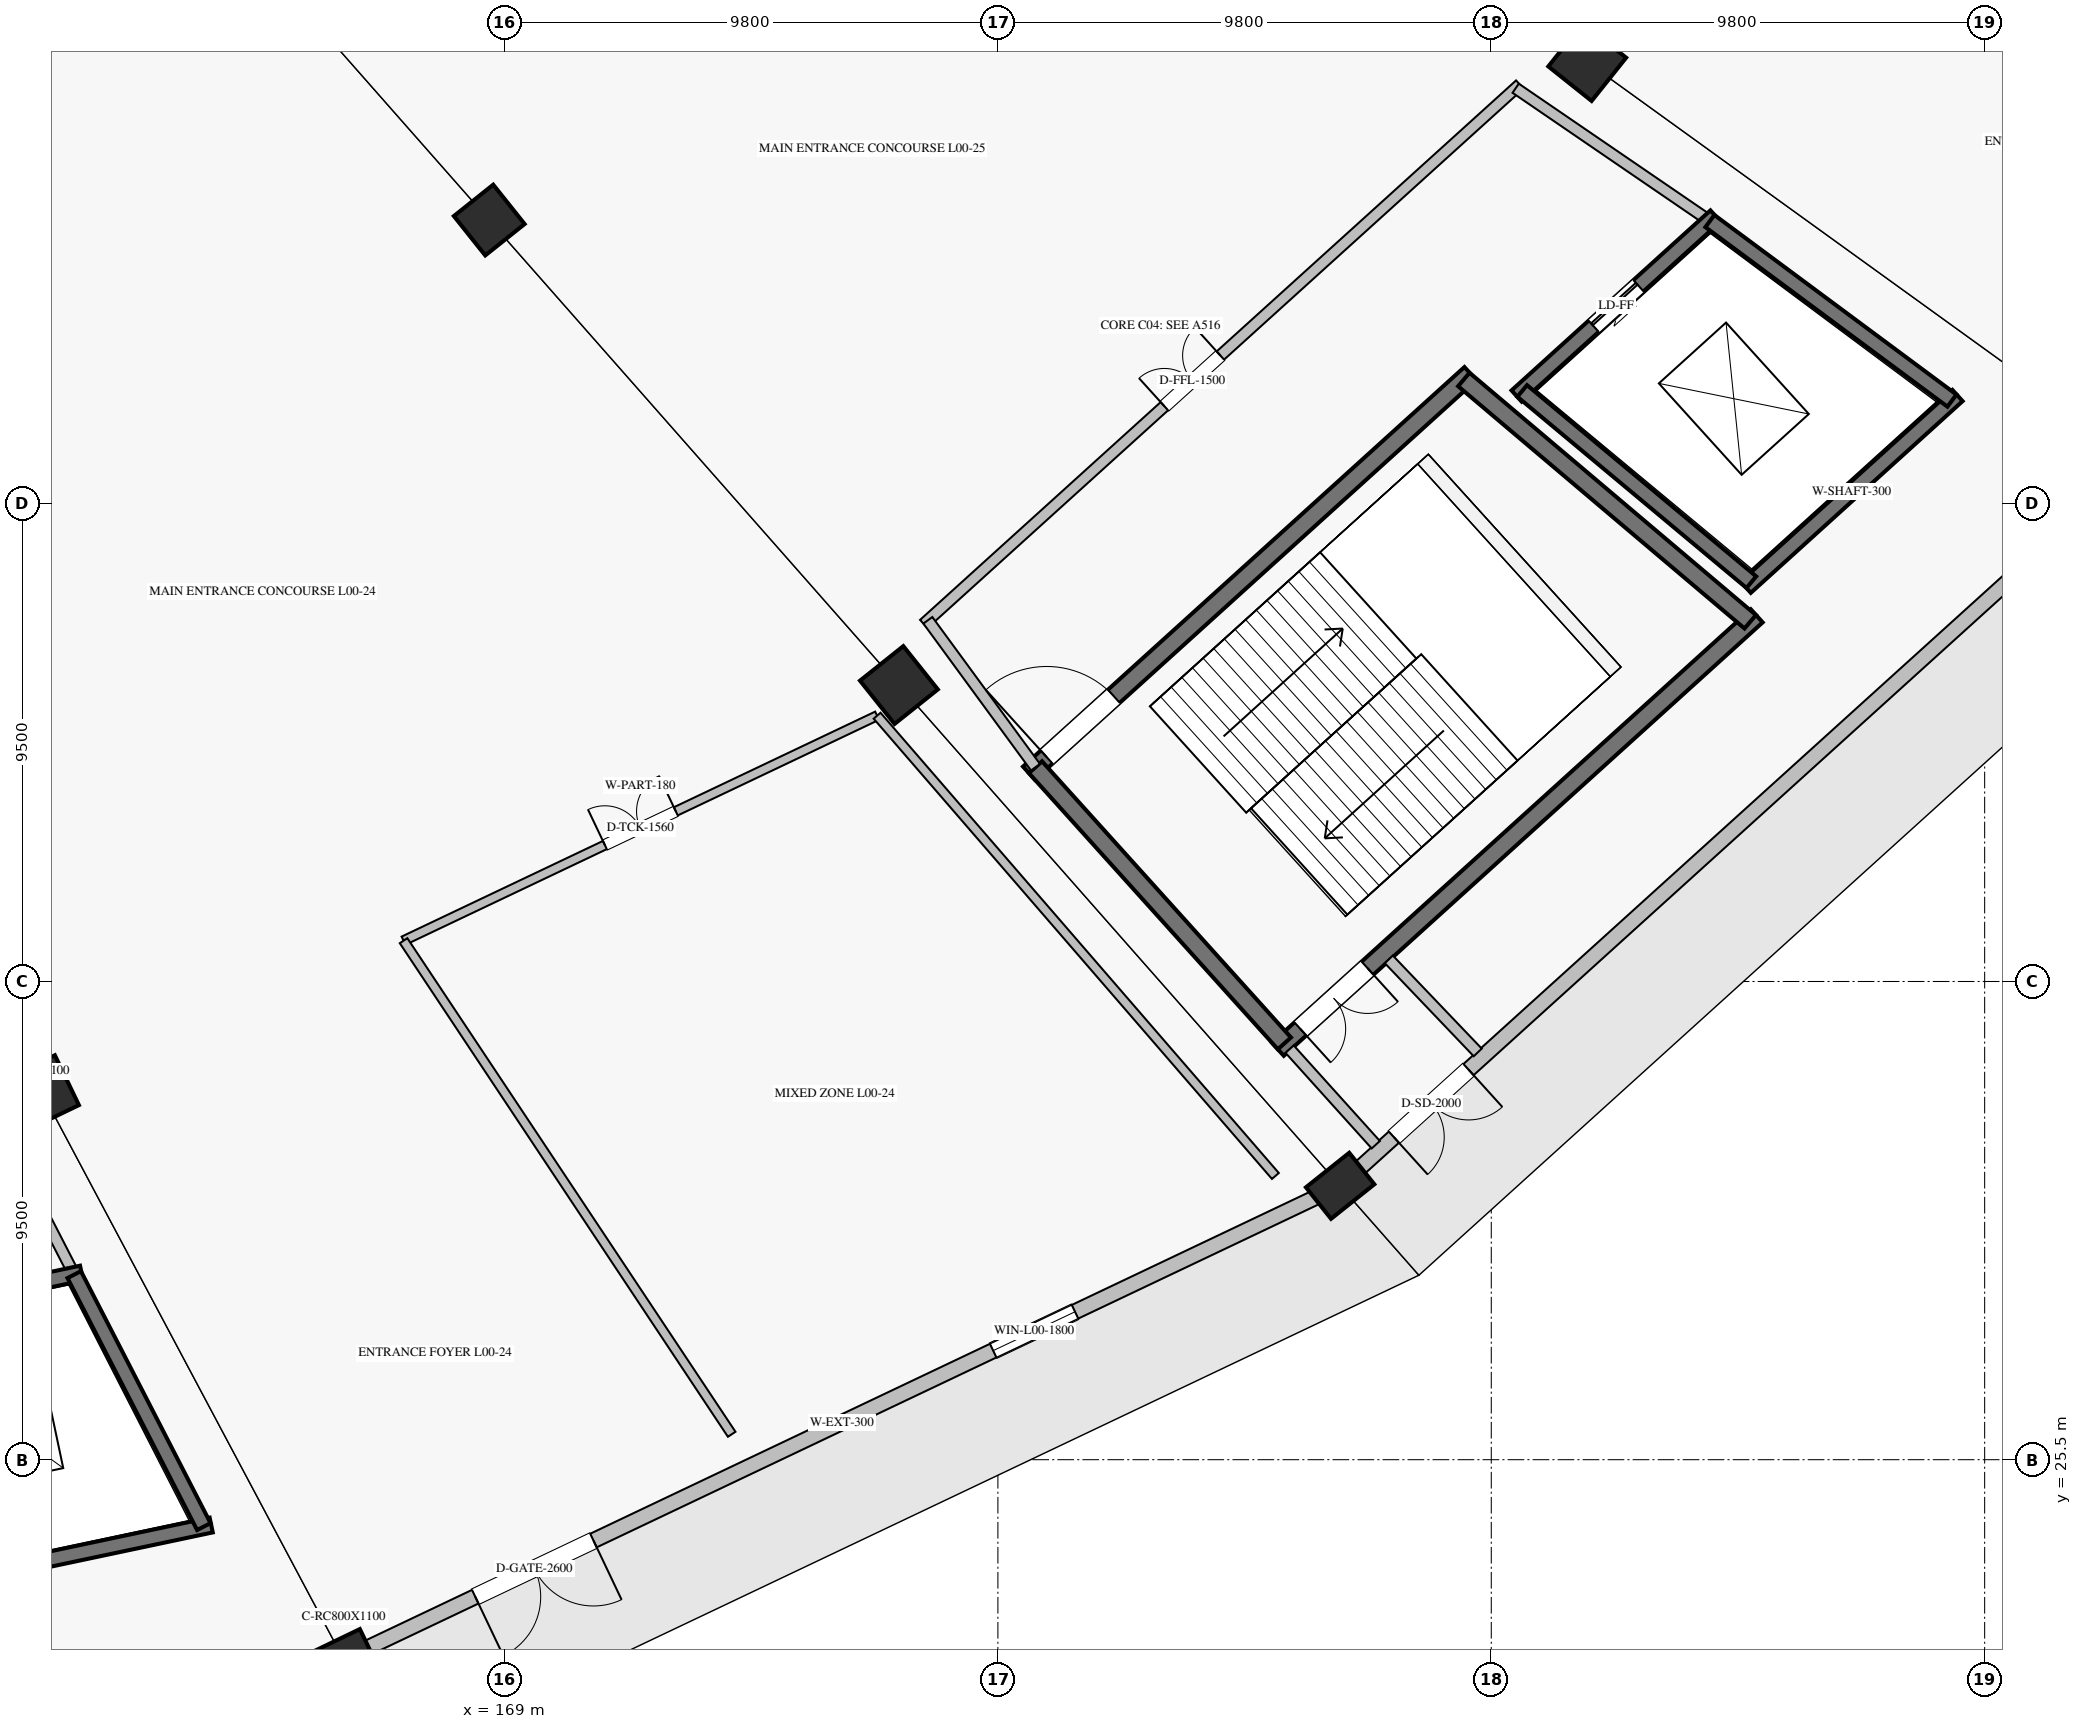
"""IFC4 building model, lengths in metres.
Left out: names, types, materials, properties, quantities, classifications, styles, units other than length and angle.
Written with IfcOpenShell. Run it as: python <this file> out.ifc"""

import sys

from ifc_helpers import new_model, si_unit, direction, frame, frame_2d, origin, origin_2d, place, context, subcontext, project, spatial, rectangle, extrude, element, fill, save


model = new_model("IFC4")
c1 = context("Model", 3, precision=1e-05, world=origin(), true_north=direction((0.0, 1.0)))
c2 = subcontext(c1, "Body", "Model", "MODEL_VIEW")
j1 = project(units=[si_unit("LENGTHUNIT", "METRE"), si_unit("PLANEANGLEUNIT", "RADIAN")], contexts=[c1])
p1 = place(None, origin())
s1 = spatial("IfcSite", under=j1, at=p1, CompositionType="ELEMENT")
p2 = place(p1, origin())
s2 = spatial("IfcBuilding", under=s1, at=p2, CompositionType="ELEMENT")
p3 = place(p2, origin())
s3 = spatial("IfcBuildingStorey", under=s2, at=p3, CompositionType="ELEMENT", Elevation=0.0)
p4 = place(p3, frame((168.697, 50.127, 0.0), z_axis=(0.0, 0.0, 1.0), x_axis=(0.623489801853, -0.781831482473, 0.0)))
e1 = element("IfcColumn", 1, at=p4, inside=s3, PredefinedType="COLUMN", context=c2, shape_type="SweptSolid", body=[
    extrude(rectangle(XDim=1.0, YDim=1.0, at=origin_2d()), origin(), (0.0, 0.0, 1.0), 5.78),
])
for number, where, z_axis, x_axis in (
    (2, (159.812, 32.801, 0.0), (0.0, 0.0, 1.0), (0.434, -0.901, 0.0)),
    (3, (176.834, 40.889, 0.0), (0.0, 0.0, 1.0), (0.623, -0.782, 0.0)),
    (4, (190.506, 53.266, 0.0), (0.0, 0.0, 1.0), (0.782, -0.623, 0.0)),
):
    element("IfcColumn", number, at=place(p3, frame(where, z_axis=z_axis, x_axis=x_axis)), inside=s3, PredefinedType="COLUMN", context=c2, shape_type="SweptSolid", body=[
        extrude(rectangle(XDim=1.1, YDim=1.1, at=origin_2d()), origin(), (0.0, 0.0, 1.0), 5.78),
    ])
for number, where, z_axis, x_axis in (
    (5, (165.805, 21.536, 0.0), (0.0, 0.0, 1.0), (0.434, -0.901, 0.0)),
    (6, (185.598, 30.941, 0.0), (0.0, 0.0, 1.0), (0.623, -0.782, 0.0)),
):
    element("IfcColumn", number, at=place(p3, frame(where, z_axis=z_axis, x_axis=x_axis)), inside=s3, PredefinedType="COLUMN", context=c2, shape_type="SweptSolid", body=[
        extrude(rectangle(XDim=0.8, YDim=1.1, at=origin_2d()), origin(), (0.0, 0.0, 1.0), 5.78),
    ])
p5 = place(p3, frame((166.157, 21.703, 0.0), z_axis=(0.0, 0.0, 1.0), x_axis=(0.903214032263, 0.429190414528, 0.0)))
e7 = element("IfcWall", 7, at=p5, inside=s3, PredefinedType="SOLIDWALL", context=c2, shape_type="SweptSolid", body=[
    extrude(rectangle(XDim=21.134, YDim=0.3, at=frame_2d((10.567, 0.0))), origin(), (0.0, 0.0, 1.0), 4.8),
])
p6 = place(p5, frame((2.504, 0.0, 0.0)))
e8 = element("IfcOpeningElement", 8, at=p6, cuts=e7, PredefinedType="OPENING", context=c2, shape_type="SweptSolid", body=[
    extrude(rectangle(XDim=2.6, YDim=2.4, at=frame_2d((1.3, 1.2))), frame((0.0, 0.16, 0.0), z_axis=(0.0, -1.0, 0.0), x_axis=(1.0, 0.0, 0.0)), (0.0, 0.0, 1.0), 0.32),
])
p7 = place(p5, frame((13.894, 0.0, 1.1)))
e9 = element("IfcOpeningElement", 9, at=p7, cuts=e7, PredefinedType="OPENING", context=c2, shape_type="SweptSolid", body=[
    extrude(rectangle(XDim=1.8, YDim=1.5, at=frame_2d((0.9, 0.75))), frame((0.0, 0.16, 0.0), z_axis=(0.0, -1.0, 0.0), x_axis=(1.0, 0.0, 0.0)), (0.0, 0.0, 1.0), 0.32),
])
p8 = place(p3, frame((185.887, 31.203, 0.0), z_axis=(0.0, 0.0, 1.0), x_axis=(0.741354093053, 0.671114080253, 0.0)))
e10 = element("IfcWall", 10, at=p8, inside=s3, PredefinedType="SOLIDWALL", context=c2, shape_type="SweptSolid", body=[
    extrude(rectangle(XDim=20.664, YDim=0.3, at=frame_2d((10.332, 0.0))), origin(), (0.0, 0.0, 1.0), 4.8),
])
p9 = place(p8, frame((1.05, 0.0, 0.0)))
e11 = element("IfcOpeningElement", 11, at=p9, cuts=e10, PredefinedType="OPENING", context=c2, shape_type="SweptSolid", body=[
    extrude(rectangle(XDim=2.0, YDim=2.3, at=frame_2d((1.0, 1.15))), frame((0.0, 0.16, 0.0), z_axis=(0.0, -1.0, 0.0), x_axis=(1.0, 0.0, 0.0)), (0.0, 0.0, 1.0), 0.32),
])
p10 = place(p3, frame((154.999, 28.023, 0.0), z_axis=(0.0, 0.0, 1.0), x_axis=(0.978345218992, 0.206979787601, 0.0)))
e12 = element("IfcWall", 12, at=p10, inside=s3, PredefinedType="SHEAR", context=c2, shape_type="SweptSolid", body=[
    extrude(rectangle(XDim=5.724, YDim=0.3, at=frame_2d((2.862, 0.0))), origin(), (0.0, 0.0, 1.0), 5.5),
])
p11 = place(p10, frame((2.462, 0.0, 0.0)))
e13 = element("IfcOpeningElement", 13, at=p11, cuts=e12, PredefinedType="OPENING", context=c2, shape_type="SweptSolid", body=[
    extrude(rectangle(XDim=1.1, YDim=2.2, at=frame_2d((0.55, 1.1))), frame((0.0, 0.16, 0.0), z_axis=(0.0, -1.0, 0.0), x_axis=(1.0, 0.0, 0.0)), (0.0, 0.0, 1.0), 0.32),
])
p12 = place(p3, frame((157.523, 23.006, 0.0), z_axis=(0.0, 0.0, 1.0), x_axis=(0.978347069901, 0.206971038591, 0.0)))
e14 = element("IfcWall", 14, at=p12, inside=s3, PredefinedType="SHEAR", context=c2, shape_type="SweptSolid", body=[
    extrude(rectangle(XDim=5.776, YDim=0.3, at=frame_2d((2.888, 0.0))), origin(), (0.0, 0.0, 1.0), 5.5),
])
p13 = place(p3, frame((160.453, 29.177, 0.0), z_axis=(0.0, 0.0, 1.0), x_axis=(0.457368592987, -0.889277217829, 0.0)))
e15 = element("IfcWall", 15, at=p13, inside=s3, PredefinedType="SHEAR", context=c2, shape_type="SweptSolid", body=[
    extrude(rectangle(XDim=5.629, YDim=0.3, at=frame_2d((2.814, 0.0))), origin(), (0.0, 0.0, 1.0), 5.5),
])
p14 = place(p3, frame((158.792, 32.406, 0.0), z_axis=(0.0, 0.0, 1.0), x_axis=(0.457349531643, -0.889287021105, 0.0)))
e16 = element("IfcWall", 16, at=p14, inside=s3, PredefinedType="SOLIDWALL", context=c2, shape_type="SweptSolid", body=[
    extrude(rectangle(XDim=3.632, YDim=0.22, at=frame_2d((1.816, 0.0))), origin(), (0.0, 0.0, 1.0), 5.5),
])
p15 = place(p3, frame((179.417, 39.14, 0.0), z_axis=(0.0, 0.0, 1.0), x_axis=(0.741348929385, 0.671119784315, 0.0)))
e17 = element("IfcWall", 17, at=p15, inside=s3, PredefinedType="SHEAR", context=c2, shape_type="SweptSolid", body=[
    extrude(rectangle(XDim=11.826, YDim=0.35, at=frame_2d((5.913, 0.0))), origin(), (0.0, 0.0, 1.0), 5.5),
])
p16 = place(p15, frame((0.475, 0.0, 0.0)))
e18 = element("IfcOpeningElement", 18, at=p16, cuts=e17, PredefinedType="OPENING", context=c2, shape_type="SweptSolid", body=[
    extrude(rectangle(XDim=1.8, YDim=2.2, at=frame_2d((0.9, 1.1))), frame((0.0, 0.185, 0.0), z_axis=(0.0, -1.0, 0.0), x_axis=(1.0, 0.0, 0.0)), (0.0, 0.0, 1.0), 0.37),
])
p17 = place(p3, frame((184.361, 33.653, 0.0), z_axis=(0.0, 0.0, 1.0), x_axis=(0.741351373721, 0.671117084183, 0.0)))
e19 = element("IfcWall", 19, at=p17, inside=s3, PredefinedType="SHEAR", context=c2, shape_type="SweptSolid", body=[
    extrude(rectangle(XDim=12.83, YDim=0.35, at=frame_2d((6.415, 0.0))), origin(), (0.0, 0.0, 1.0), 5.5),
])
p18 = place(p17, frame((0.602, 0.0, 0.0)))
e20 = element("IfcOpeningElement", 20, at=p18, cuts=e19, PredefinedType="OPENING", context=c2, shape_type="SweptSolid", body=[
    extrude(rectangle(XDim=1.8, YDim=2.2, at=frame_2d((0.9, 1.1))), frame((0.0, 0.185, 0.0), z_axis=(0.0, -1.0, 0.0), x_axis=(1.0, 0.0, 0.0)), (0.0, 0.0, 1.0), 0.37),
])
p19 = place(p3, frame((184.595, 33.656, 0.0), z_axis=(0.0, 0.0, 1.0), x_axis=(0.669523961342, -0.742790458467, 0.0)))
e21 = element("IfcWall", 21, at=p19, inside=s3, PredefinedType="SOLIDWALL", context=c2, shape_type="SweptSolid", body=[
    extrude(rectangle(XDim=2.556, YDim=0.22, at=frame_2d((1.278, 0.0))), origin(), (0.0, 0.0, 1.0), 5.5),
])
p20 = place(p3, frame((186.565, 35.439, 0.0), z_axis=(0.0, 0.0, 1.0), x_axis=(0.690686933178, -0.7231538981, 0.0)))
e22 = element("IfcWall", 22, at=p20, inside=s3, PredefinedType="SOLIDWALL", context=c2, shape_type="SweptSolid", body=[
    extrude(rectangle(XDim=2.557, YDim=0.22, at=frame_2d((1.278, 0.0))), origin(), (0.0, 0.0, 1.0), 5.5),
])
p21 = place(p3, frame((179.546, 39.257, 0.0), z_axis=(0.0, 0.0, 1.0), x_axis=(0.669463145673, -0.742845270958, 0.0)))
e23 = element("IfcWall", 23, at=p21, inside=s3, PredefinedType="SHEAR", context=c2, shape_type="SweptSolid", body=[
    extrude(rectangle(XDim=7.386, YDim=0.35, at=frame_2d((3.693, 0.0))), origin(), (0.0, 0.0, 1.0), 5.5),
])
p22 = place(p3, frame((188.055, 46.959, 0.0), z_axis=(0.0, 0.0, 1.0), x_axis=(0.763422324031, -0.64589964791, 0.0)))
e24 = element("IfcWall", 24, at=p22, inside=s3, PredefinedType="SHEAR", context=c2, shape_type="SweptSolid", body=[
    extrude(rectangle(XDim=7.452, YDim=0.35, at=frame_2d((3.726, 0.0))), origin(), (0.0, 0.0, 1.0), 5.5),
])
p23 = place(p3, frame((189.103, 46.631, 0.0), z_axis=(0.0, 0.0, 1.0), x_axis=(0.741350155641, 0.671118429736, 0.0)))
e25 = element("IfcWall", 25, at=p23, inside=s3, PredefinedType="SHEAR", context=c2, shape_type="SweptSolid", body=[
    extrude(rectangle(XDim=5.329, YDim=0.3, at=frame_2d((2.665, 0.0))), origin(), (0.0, 0.0, 1.0), 5.5),
])
p24 = place(p23, frame((2.065, 0.0, 0.0)))
e26 = element("IfcOpeningElement", 26, at=p24, cuts=e25, PredefinedType="OPENING", context=c2, shape_type="SweptSolid", body=[
    extrude(rectangle(XDim=1.2, YDim=2.2, at=frame_2d((0.6, 1.1))), frame((0.0, 0.16, 0.0), z_axis=(0.0, -1.0, 0.0), x_axis=(1.0, 0.0, 0.0)), (0.0, 0.0, 1.0), 0.32),
])
p25 = place(p3, frame((193.654, 42.832, 0.0), z_axis=(0.0, 0.0, 1.0), x_axis=(0.74134208775, 0.671127341815, 0.0)))
e27 = element("IfcWall", 27, at=p25, inside=s3, PredefinedType="SHEAR", context=c2, shape_type="SweptSolid", body=[
    extrude(rectangle(XDim=5.675, YDim=0.3, at=frame_2d((2.837, 0.0))), origin(), (0.0, 0.0, 1.0), 5.5),
])
p26 = place(p3, frame((189.214, 46.732, 0.0), z_axis=(0.0, 0.0, 1.0), x_axis=(0.767711354146, -0.640795815151, 0.0)))
e28 = element("IfcWall", 28, at=p26, inside=s3, PredefinedType="SHEAR", context=c2, shape_type="SweptSolid", body=[
    extrude(rectangle(XDim=5.929, YDim=0.3, at=frame_2d((2.964, 0.0))), origin(), (0.0, 0.0, 1.0), 5.5),
])
p27 = place(p3, frame((192.942, 50.107, 0.0), z_axis=(0.0, 0.0, 1.0), x_axis=(0.803101805449, -0.59584183311, 0.0)))
e29 = element("IfcWall", 29, at=p27, inside=s3, PredefinedType="SHEAR", context=c2, shape_type="SweptSolid", body=[
    extrude(rectangle(XDim=5.986, YDim=0.3, at=frame_2d((2.993, 0.0))), origin(), (0.0, 0.0, 1.0), 5.5),
])
p28 = place(p3, frame((177.327, 42.102, 0.0), z_axis=(0.0, 0.0, 1.0), x_axis=(0.741351035574, 0.671117457717, 0.0)))
e30 = element("IfcWall", 30, at=p28, inside=s3, PredefinedType="SOLIDWALL", context=c2, shape_type="SweptSolid", body=[
    extrude(rectangle(XDim=15.969, YDim=0.22, at=frame_2d((7.985, 0.0))), origin(), (0.0, 0.0, 1.0), 5.5),
])
p29 = place(p28, frame((6.447, 0.0, 0.0)))
e31 = element("IfcOpeningElement", 31, at=p29, cuts=e30, PredefinedType="OPENING", context=c2, shape_type="SweptSolid", body=[
    extrude(rectangle(XDim=1.5, YDim=2.2, at=frame_2d((0.75, 1.1))), frame((0.0, 0.12, 0.0), z_axis=(0.0, -1.0, 0.0), x_axis=(1.0, 0.0, 0.0)), (0.0, 0.0, 1.0), 0.24),
])
p30 = place(p3, frame((177.409, 42.176, 0.0), z_axis=(0.0, 0.0, 1.0), x_axis=(0.590836915359, -0.806791013491, 0.0)))
e32 = element("IfcWall", 32, at=p30, inside=s3, PredefinedType="SOLIDWALL", context=c2, shape_type="SweptSolid", body=[
    extrude(rectangle(XDim=3.618, YDim=0.22, at=frame_2d((1.809, 0.0))), origin(), (0.0, 0.0, 1.0), 5.5),
])
p31 = place(p3, frame((189.085, 52.746, 0.0), z_axis=(0.0, 0.0, 1.0), x_axis=(0.825385410642, -0.564569680287, 0.0)))
e33 = element("IfcWall", 33, at=p31, inside=s3, PredefinedType="SOLIDWALL", context=c2, shape_type="SweptSolid", body=[
    extrude(rectangle(XDim=4.674, YDim=0.22, at=frame_2d((2.337, 0.0))), origin(), (0.0, 0.0, 1.0), 5.5),
])
p32 = place(p3, frame((166.995, 35.811, 0.0), z_axis=(0.0, 0.0, 1.0), x_axis=(0.903212529205, 0.42919357764, 0.0)))
e34 = element("IfcWall", 34, at=p32, inside=s3, PredefinedType="PARTITIONING", context=c2, shape_type="SweptSolid", body=[
    extrude(rectangle(XDim=10.414, YDim=0.18, at=frame_2d((5.207, 0.0))), origin(), (0.0, 0.0, 1.0), 4.82),
])
p33 = place(p32, frame((4.427, 0.0, 0.0)))
e35 = element("IfcOpeningElement", 35, at=p33, cuts=e34, PredefinedType="OPENING", context=c2, shape_type="SweptSolid", body=[
    extrude(rectangle(XDim=1.56, YDim=2.25, at=frame_2d((0.78, 1.125))), frame((0.0, 0.1, 0.0), z_axis=(0.0, -1.0, 0.0), x_axis=(1.0, 0.0, 0.0)), (0.0, 0.0, 1.0), 0.2),
])
p34 = place(p3, frame((166.995, 35.811, 0.0), z_axis=(0.0, 0.0, 1.0), x_axis=(0.553565629172, -0.832805556057, 0.0)))
e36 = element("IfcWall", 36, at=p34, inside=s3, PredefinedType="PARTITIONING", context=c2, shape_type="SweptSolid", body=[
    extrude(rectangle(XDim=11.774, YDim=0.18, at=frame_2d((5.887, 0.0))), origin(), (0.0, 0.0, 1.0), 4.82),
])
p35 = place(p3, frame((176.401, 40.28, 0.0), z_axis=(0.0, 0.0, 1.0), x_axis=(0.654293035882, -0.756241114458, 0.0)))
e37 = element("IfcWall", 37, at=p35, inside=s3, PredefinedType="PARTITIONING", context=c2, shape_type="SweptSolid", body=[
    extrude(rectangle(XDim=12.091, YDim=0.18, at=frame_2d((6.045, 0.0))), origin(), (0.0, 0.0, 1.0), 4.82),
])
p36 = place(p3, frame((194.5, 59.386, 0.0), z_axis=(0.0, 0.0, 1.0), x_axis=(0.859002064999, -0.511972120654, 0.0)))
e38 = element("IfcWall", 38, at=p36, inside=s3, PredefinedType="PARTITIONING", context=c2, shape_type="SweptSolid", body=[
    extrude(rectangle(XDim=12.331, YDim=0.18, at=frame_2d((6.166, 0.0))), origin(), (0.0, 0.0, 1.0), 4.82),
])
p37 = place(p6, frame((2.6, 0.0, 0.0), z_axis=(0.0, 0.0, 1.0), x_axis=(-1.0, 0.0, 0.0)))
e39 = element("IfcDoor", 39, at=p37, inside=s3, OperationType="DOUBLE_DOOR_SINGLE_SWING", PredefinedType="DOOR", context=c2, shape_type="SweptSolid", body=[
    extrude(rectangle(XDim=2.6, YDim=2.4, at=frame_2d((1.3, 1.2))), frame((0.0, 0.025, 0.0), z_axis=(0.0, -1.0, 0.0), x_axis=(1.0, 0.0, 0.0)), (0.0, 0.0, 1.0), 0.05),
])
fill(e8, e39)
p38 = place(p7, origin())
e40 = element("IfcWindow", 40, at=p38, inside=s3, PartitioningType="SINGLE_PANEL", PredefinedType="WINDOW", context=c2, shape_type="SweptSolid", body=[
    extrude(rectangle(XDim=1.8, YDim=1.5, at=frame_2d((0.9, 0.75))), frame((0.0, 0.03, 0.0), z_axis=(0.0, -1.0, 0.0), x_axis=(1.0, 0.0, 0.0)), (0.0, 0.0, 1.0), 0.06),
])
fill(e9, e40)
p39 = place(p9, frame((2.0, 0.0, 0.0), z_axis=(0.0, 0.0, 1.0), x_axis=(-1.0, 0.0, 0.0)))
e41 = element("IfcDoor", 41, at=p39, inside=s3, OperationType="DOUBLE_DOOR_SINGLE_SWING", PredefinedType="DOOR", context=c2, shape_type="SweptSolid", body=[
    extrude(rectangle(XDim=2.0, YDim=2.3, at=frame_2d((1.0, 1.15))), frame((0.0, 0.025, 0.0), z_axis=(0.0, -1.0, 0.0), x_axis=(1.0, 0.0, 0.0)), (0.0, 0.0, 1.0), 0.05),
])
fill(e11, e41)
p40 = place(p18, frame((1.8, 0.0, 0.0), z_axis=(0.0, 0.0, 1.0), x_axis=(-1.0, 0.0, 0.0)))
e42 = element("IfcDoor", 42, at=p40, inside=s3, OperationType="DOUBLE_DOOR_SINGLE_SWING", PredefinedType="DOOR", context=c2, shape_type="SweptSolid", body=[
    extrude(rectangle(XDim=1.8, YDim=2.2, at=frame_2d((0.9, 1.1))), frame((0.0, 0.025, 0.0), z_axis=(0.0, -1.0, 0.0), x_axis=(1.0, 0.0, 0.0)), (0.0, 0.0, 1.0), 0.05),
])
fill(e20, e42)
p41 = place(p16, origin())
e43 = element("IfcDoor", 43, at=p41, inside=s3, OperationType="SINGLE_SWING_LEFT", PredefinedType="DOOR", context=c2, shape_type="SweptSolid", body=[
    extrude(rectangle(XDim=1.8, YDim=2.2, at=frame_2d((0.9, 1.1))), frame((0.0, 0.025, 0.0), z_axis=(0.0, -1.0, 0.0), x_axis=(1.0, 0.0, 0.0)), (0.0, 0.0, 1.0), 0.05),
])
fill(e18, e43)
p42 = place(p24, origin())
e44 = element("IfcDoor", 44, at=p42, inside=s3, OperationType="SLIDING_TO_LEFT", PredefinedType="DOOR", context=c2, shape_type="SweptSolid", body=[
    extrude(rectangle(XDim=1.2, YDim=2.2, at=frame_2d((0.6, 1.1))), frame((0.0, 0.025, 0.0), z_axis=(0.0, -1.0, 0.0), x_axis=(1.0, 0.0, 0.0)), (0.0, 0.0, 1.0), 0.05),
])
fill(e26, e44)
p43 = place(p29, origin())
e45 = element("IfcDoor", 45, at=p43, inside=s3, OperationType="DOUBLE_DOOR_SINGLE_SWING", PredefinedType="DOOR", context=c2, shape_type="SweptSolid", body=[
    extrude(rectangle(XDim=1.5, YDim=2.2, at=frame_2d((0.75, 1.1))), frame((0.0, 0.025, 0.0), z_axis=(0.0, -1.0, 0.0), x_axis=(1.0, 0.0, 0.0)), (0.0, 0.0, 1.0), 0.05),
])
fill(e31, e45)
p44 = place(p33, origin())
e46 = element("IfcDoor", 46, at=p44, inside=s3, OperationType="DOUBLE_DOOR_SINGLE_SWING", PredefinedType="DOOR", context=c2, shape_type="SweptSolid", body=[
    extrude(rectangle(XDim=1.56, YDim=2.25, at=frame_2d((0.78, 1.125))), frame((0.0, 0.025, 0.0), z_axis=(0.0, -1.0, 0.0), x_axis=(1.0, 0.0, 0.0)), (0.0, 0.0, 1.0), 0.05),
])
fill(e35, e46)
save(model, sys.argv[1])
